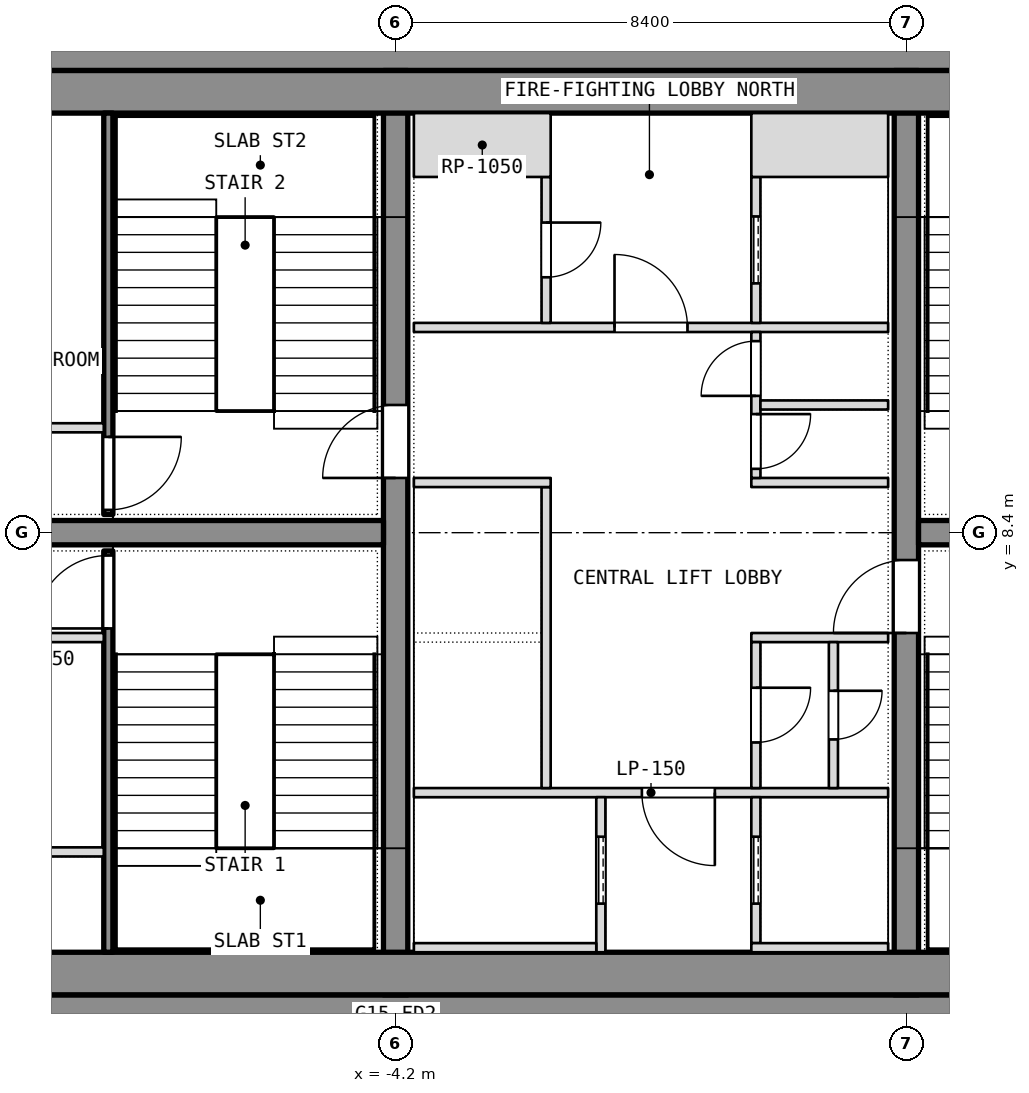
"""IFC4 building model, lengths in metres.
Left out: names, types, materials, properties, quantities, classifications, styles, units other than length and angle.
Written with IfcOpenShell. Run it as: python <this file> out.ifc"""

import sys

from ifc_helpers import new_model, si_unit, direction, frame, frame_2d, origin, place, context, subcontext, project, spatial, rectangle, extrude, element, fill, save


model = new_model("IFC4")
c1 = context("Model", 3, precision=1e-05, world=origin(), true_north=direction((0.0, 1.0)))
c2 = subcontext(c1, "Body", "Model", "MODEL_VIEW")
j1 = project(units=[si_unit("LENGTHUNIT", "METRE"), si_unit("PLANEANGLEUNIT", "RADIAN")], contexts=[c1])
p1 = place(None, origin())
s1 = spatial("IfcSite", under=j1, at=p1, CompositionType="ELEMENT")
p2 = place(p1, origin())
s2 = spatial("IfcBuilding", under=s1, at=p2, CompositionType="ELEMENT")
p3 = place(p2, frame((0.0, 0.0, 194.9)))
s3 = spatial("IfcBuildingStorey", under=s2, at=p3, CompositionType="ELEMENT", Elevation=194.9)
for number, where, z_axis, x_axis in (
    (1, (-11.1, 0.4, 0.0), (0.0, 0.0, 1.0), (1.0, 0.0, 0.0)),
    (2, (-11.1, 16.4, 0.0), (0.0, 0.0, 1.0), (1.0, 0.0, 0.0)),
):
    element("IfcWall", number, at=place(p3, frame(where, z_axis=z_axis, x_axis=x_axis)), inside=s3, PredefinedType="SHEAR", context=c2, shape_type="SweptSolid", body=[
        extrude(rectangle(XDim=22.2, YDim=0.8, at=frame_2d((11.1, 0.0))), origin(), (0.0, 0.0, 1.0), 3.6),
    ])
p4 = place(p3, frame((-4.2, 0.8, 0.0), z_axis=(0.0, 0.0, 1.0), x_axis=(0.0, 1.0, 0.0)))
e3 = element("IfcWall", 3, at=p4, inside=s3, PredefinedType="SHEAR", context=c2, shape_type="SweptSolid", body=[
    extrude(rectangle(XDim=15.2, YDim=0.4, at=frame_2d((7.6, 0.0))), origin(), (0.0, 0.0, 1.0), 3.6),
])
p5 = place(p4, frame((8.5, 0.0, 0.0)))
e4 = element("IfcOpeningElement", 4, at=p5, cuts=e3, PredefinedType="OPENING", context=c2, shape_type="SweptSolid", body=[
    extrude(rectangle(XDim=1.2, YDim=2.1, at=frame_2d((0.6, 1.05))), frame((0.0, 0.2, 0.0), z_axis=(0.0, -1.0, 0.0), x_axis=(1.0, 0.0, 0.0)), (0.0, 0.0, 1.0), 0.4),
])
p6 = place(p3, frame((4.2, 0.8, 0.0), z_axis=(0.0, 0.0, 1.0), x_axis=(0.0, 1.0, 0.0)))
e5 = element("IfcWall", 5, at=p6, inside=s3, PredefinedType="SHEAR", context=c2, shape_type="SweptSolid", body=[
    extrude(rectangle(XDim=15.2, YDim=0.4, at=frame_2d((7.6, 0.0))), origin(), (0.0, 0.0, 1.0), 3.6),
])
p7 = place(p6, frame((5.95, 0.0, 0.0)))
e6 = element("IfcOpeningElement", 6, at=p7, cuts=e5, PredefinedType="OPENING", context=c2, shape_type="SweptSolid", body=[
    extrude(rectangle(XDim=1.2, YDim=2.1, at=frame_2d((0.6, 1.05))), frame((0.0, 0.2, 0.0), z_axis=(0.0, -1.0, 0.0), x_axis=(1.0, 0.0, 0.0)), (0.0, 0.0, 1.0), 0.4),
])
for number, where, z_axis, x_axis in (
    (7, (-11.1, 8.4, 0.0), (0.0, 0.0, 1.0), (1.0, 0.0, 0.0)),
    (8, (4.4, 8.4, 0.0), (0.0, 0.0, 1.0), (1.0, 0.0, 0.0)),
):
    element("IfcWall", number, at=place(p3, frame(where, z_axis=z_axis, x_axis=x_axis)), inside=s3, PredefinedType="SHEAR", context=c2, shape_type="SweptSolid", body=[
        extrude(rectangle(XDim=6.7, YDim=0.4, at=frame_2d((3.35, 0.0))), origin(), (0.0, 0.0, 1.0), 3.6),
    ])
for number, where, z_axis, x_axis in (
    (9, (-11.1, 1.15, 0.0), (0.0, 0.0, 1.0), (1.0, 0.0, 0.0)),
    (10, (-11.1, 15.65, 0.0), (0.0, 0.0, 1.0), (1.0, 0.0, 0.0)),
):
    element("IfcWall", number, at=place(p3, frame(where, z_axis=z_axis, x_axis=x_axis)), inside=s3, PredefinedType="PARTITIONING", context=c2, shape_type="SweptSolid", body=[
        extrude(rectangle(XDim=22.2, YDim=0.7, at=frame_2d((11.1, 0.0))), origin(), (0.0, 0.0, 1.0), 3.34),
    ])
p8 = place(p3, frame((-8.925, 1.5, 0.0), z_axis=(0.0, 0.0, 1.0), x_axis=(0.0, 1.0, 0.0)))
e11 = element("IfcWall", 11, at=p8, inside=s3, PredefinedType="SHEAR", context=c2, shape_type="SweptSolid", body=[
    extrude(rectangle(XDim=6.6, YDim=0.15, at=frame_2d((3.3, 0.0))), origin(), (0.0, 0.0, 1.0), 3.34),
])
p9 = place(p8, frame((5.325, 0.0, 0.0)))
e12 = element("IfcOpeningElement", 12, at=p9, cuts=e11, PredefinedType="OPENING", context=c2, shape_type="SweptSolid", body=[
    extrude(rectangle(XDim=1.2, YDim=2.1, at=frame_2d((0.6, 1.05))), frame((0.0, 0.075, 0.0), z_axis=(0.0, -1.0, 0.0), x_axis=(1.0, 0.0, 0.0)), (0.0, 0.0, 1.0), 0.15),
])
for number, where, z_axis, x_axis in (
    (13, (-11.1, 6.675, 0.0), (0.0, 0.0, 1.0), (1.0, 0.0, 0.0)),
    (14, (-11.1, 3.15, 0.0), (0.0, 0.0, 1.0), (1.0, 0.0, 0.0)),
):
    element("IfcWall", number, at=place(p3, frame(where, z_axis=z_axis, x_axis=x_axis)), inside=s3, PredefinedType="PARTITIONING", context=c2, shape_type="SweptSolid", body=[
        extrude(rectangle(XDim=2.1, YDim=0.15, at=frame_2d((1.05, 0.0))), origin(), (0.0, 0.0, 1.0), 3.34),
    ])
p10 = place(p3, frame((-8.925, 8.7, 0.0), z_axis=(0.0, 0.0, 1.0), x_axis=(0.0, 1.0, 0.0)))
e15 = element("IfcWall", 15, at=p10, inside=s3, PredefinedType="SHEAR", context=c2, shape_type="SweptSolid", body=[
    extrude(rectangle(XDim=6.6, YDim=0.15, at=frame_2d((3.3, 0.0))), origin(), (0.0, 0.0, 1.0), 3.34),
])
p11 = place(p10, frame((0.075, 0.0, 0.0)))
e16 = element("IfcOpeningElement", 16, at=p11, cuts=e15, PredefinedType="OPENING", context=c2, shape_type="SweptSolid", body=[
    extrude(rectangle(XDim=1.2, YDim=2.1, at=frame_2d((0.6, 1.05))), frame((0.0, 0.075, 0.0), z_axis=(0.0, -1.0, 0.0), x_axis=(1.0, 0.0, 0.0)), (0.0, 0.0, 1.0), 0.15),
])
p12 = place(p3, frame((-11.1, 10.125, 0.0), z_axis=(0.0, 0.0, 1.0), x_axis=(1.0, 0.0, 0.0)))
e17 = element("IfcWall", 17, at=p12, inside=s3, PredefinedType="PARTITIONING", context=c2, shape_type="SweptSolid", body=[
    extrude(rectangle(XDim=2.1, YDim=0.15, at=frame_2d((1.05, 0.0))), origin(), (0.0, 0.0, 1.0), 3.34),
])
p13 = place(p3, frame((-3.9, 4.125, 0.0), z_axis=(0.0, 0.0, 1.0), x_axis=(1.0, 0.0, 0.0)))
e18 = element("IfcWall", 18, at=p13, inside=s3, PredefinedType="PARTITIONING", context=c2, shape_type="SweptSolid", body=[
    extrude(rectangle(XDim=7.8, YDim=0.15, at=frame_2d((3.9, 0.0))), origin(), (0.0, 0.0, 1.0), 3.34),
])
p14 = place(p13, frame((3.75, 0.0, 0.0)))
e19 = element("IfcOpeningElement", 19, at=p14, cuts=e18, PredefinedType="OPENING", context=c2, shape_type="SweptSolid", body=[
    extrude(rectangle(XDim=1.2, YDim=2.1, at=frame_2d((0.6, 1.05))), frame((0.0, 0.075, 0.0), z_axis=(0.0, -1.0, 0.0), x_axis=(1.0, 0.0, 0.0)), (0.0, 0.0, 1.0), 0.15),
])
p15 = place(p3, frame((-3.9, 11.775, 0.0), z_axis=(0.0, 0.0, 1.0), x_axis=(1.0, 0.0, 0.0)))
e20 = element("IfcWall", 20, at=p15, inside=s3, PredefinedType="PARTITIONING", context=c2, shape_type="SweptSolid", body=[
    extrude(rectangle(XDim=7.8, YDim=0.15, at=frame_2d((3.9, 0.0))), origin(), (0.0, 0.0, 1.0), 3.34),
])
p16 = place(p15, frame((3.3, 0.0, 0.0)))
e21 = element("IfcOpeningElement", 21, at=p16, cuts=e20, PredefinedType="OPENING", context=c2, shape_type="SweptSolid", body=[
    extrude(rectangle(XDim=1.2, YDim=2.1, at=frame_2d((0.6, 1.05))), frame((0.0, 0.075, 0.0), z_axis=(0.0, -1.0, 0.0), x_axis=(1.0, 0.0, 0.0)), (0.0, 0.0, 1.0), 0.15),
])
p17 = place(p3, frame((-0.825, 1.5, 0.0), z_axis=(0.0, 0.0, 1.0), x_axis=(0.0, 1.0, 0.0)))
e22 = element("IfcWall", 22, at=p17, inside=s3, PredefinedType="SHEAR", context=c2, shape_type="SweptSolid", body=[
    extrude(rectangle(XDim=2.55, YDim=0.15, at=frame_2d((1.275, 0.0))), origin(), (0.0, 0.0, 1.0), 3.6),
])
p18 = place(p17, frame((0.8, 0.0, 0.0)))
e23 = element("IfcOpeningElement", 23, at=p18, cuts=e22, PredefinedType="OPENING", context=c2, shape_type="SweptSolid", body=[
    extrude(rectangle(XDim=1.1, YDim=2.1, at=frame_2d((0.55, 1.05))), frame((0.0, 0.075, 0.0), z_axis=(0.0, -1.0, 0.0), x_axis=(1.0, 0.0, 0.0)), (0.0, 0.0, 1.0), 0.15),
])
p19 = place(p3, frame((-3.9, 1.575, 0.0), z_axis=(0.0, 0.0, 1.0), x_axis=(1.0, 0.0, 0.0)))
e24 = element("IfcWall", 24, at=p19, inside=s3, PredefinedType="SHEAR", context=c2, shape_type="SweptSolid", body=[
    extrude(rectangle(XDim=3.0, YDim=0.15, at=frame_2d((1.5, 0.0))), origin(), (0.0, 0.0, 1.0), 3.6),
])
p20 = place(p3, frame((-1.725, 4.2, 0.0), z_axis=(0.0, 0.0, 1.0), x_axis=(0.0, 1.0, 0.0)))
e25 = element("IfcWall", 25, at=p20, inside=s3, PredefinedType="SHEAR", context=c2, shape_type="SweptSolid", body=[
    extrude(rectangle(XDim=4.95, YDim=0.15, at=frame_2d((2.475, 0.0))), origin(), (0.0, 0.0, 1.0), 3.6),
])
p21 = place(p3, frame((-3.9, 9.225, 0.0), z_axis=(0.0, 0.0, 1.0), x_axis=(1.0, 0.0, 0.0)))
e26 = element("IfcWall", 26, at=p21, inside=s3, PredefinedType="SHEAR", context=c2, shape_type="SweptSolid", body=[
    extrude(rectangle(XDim=2.25, YDim=0.15, at=frame_2d((1.125, 0.0))), origin(), (0.0, 0.0, 1.0), 3.6),
])
p22 = place(p3, frame((-1.725, 11.85, 0.0), z_axis=(0.0, 0.0, 1.0), x_axis=(0.0, 1.0, 0.0)))
e27 = element("IfcWall", 27, at=p22, inside=s3, PredefinedType="PARTITIONING", context=c2, shape_type="SweptSolid", body=[
    extrude(rectangle(XDim=2.4, YDim=0.15, at=frame_2d((1.2, 0.0))), origin(), (0.0, 0.0, 1.0), 3.34),
])
p23 = place(p22, frame((0.75, 0.0, 0.0)))
e28 = element("IfcOpeningElement", 28, at=p23, cuts=e27, PredefinedType="OPENING", context=c2, shape_type="SweptSolid", body=[
    extrude(rectangle(XDim=0.9, YDim=2.1, at=frame_2d((0.45, 1.05))), frame((0.0, 0.075, 0.0), z_axis=(0.0, -1.0, 0.0), x_axis=(1.0, 0.0, 0.0)), (0.0, 0.0, 1.0), 0.15),
])
p24 = place(p3, frame((-3.9, 14.775, 0.0), z_axis=(0.0, 0.0, 1.0), x_axis=(1.0, 0.0, 0.0)))
e29 = element("IfcWall", 29, at=p24, inside=s3, PredefinedType="PARTITIONING", context=c2, shape_type="SweptSolid", body=[
    extrude(rectangle(XDim=2.25, YDim=1.05, at=frame_2d((1.125, 0.0))), origin(), (0.0, 0.0, 1.0), 3.34),
])
p25 = place(p3, frame((1.725, 1.65, 0.0), z_axis=(0.0, 0.0, 1.0), x_axis=(0.0, 1.0, 0.0)))
e30 = element("IfcWall", 30, at=p25, inside=s3, PredefinedType="SHEAR", context=c2, shape_type="SweptSolid", body=[
    extrude(rectangle(XDim=2.4, YDim=0.15, at=frame_2d((1.2, 0.0))), origin(), (0.0, 0.0, 1.0), 3.6),
])
p26 = place(p25, frame((0.65, 0.0, 0.0)))
e31 = element("IfcOpeningElement", 31, at=p26, cuts=e30, PredefinedType="OPENING", context=c2, shape_type="SweptSolid", body=[
    extrude(rectangle(XDim=1.1, YDim=2.1, at=frame_2d((0.55, 1.05))), frame((0.0, 0.075, 0.0), z_axis=(0.0, -1.0, 0.0), x_axis=(1.0, 0.0, 0.0)), (0.0, 0.0, 1.0), 0.15),
])
p27 = place(p3, frame((1.65, 1.575, 0.0), z_axis=(0.0, 0.0, 1.0), x_axis=(1.0, 0.0, 0.0)))
e32 = element("IfcWall", 32, at=p27, inside=s3, PredefinedType="SHEAR", context=c2, shape_type="SweptSolid", body=[
    extrude(rectangle(XDim=2.25, YDim=0.15, at=frame_2d((1.125, 0.0))), origin(), (0.0, 0.0, 1.0), 3.6),
])
p28 = place(p3, frame((1.725, 11.85, 0.0), z_axis=(0.0, 0.0, 1.0), x_axis=(0.0, 1.0, 0.0)))
e33 = element("IfcWall", 33, at=p28, inside=s3, PredefinedType="SHEAR", context=c2, shape_type="SweptSolid", body=[
    extrude(rectangle(XDim=2.4, YDim=0.15, at=frame_2d((1.2, 0.0))), origin(), (0.0, 0.0, 1.0), 3.6),
])
p29 = place(p28, frame((0.65, 0.0, 0.0)))
e34 = element("IfcOpeningElement", 34, at=p29, cuts=e33, PredefinedType="OPENING", context=c2, shape_type="SweptSolid", body=[
    extrude(rectangle(XDim=1.1, YDim=2.1, at=frame_2d((0.55, 1.05))), frame((0.0, 0.075, 0.0), z_axis=(0.0, -1.0, 0.0), x_axis=(1.0, 0.0, 0.0)), (0.0, 0.0, 1.0), 0.15),
])
p30 = place(p3, frame((1.65, 14.775, 0.0), z_axis=(0.0, 0.0, 1.0), x_axis=(1.0, 0.0, 0.0)))
e35 = element("IfcWall", 35, at=p30, inside=s3, PredefinedType="SHEAR", context=c2, shape_type="SweptSolid", body=[
    extrude(rectangle(XDim=2.25, YDim=1.05, at=frame_2d((1.125, 0.0))), origin(), (0.0, 0.0, 1.0), 3.6),
])
for number, where, z_axis, x_axis in (
    (36, (1.65, 6.675, 0.0), (0.0, 0.0, 1.0), (1.0, 0.0, 0.0)),
    (37, (1.65, 9.225, 0.0), (0.0, 0.0, 1.0), (1.0, 0.0, 0.0)),
):
    element("IfcWall", number, at=place(p3, frame(where, z_axis=z_axis, x_axis=x_axis)), inside=s3, PredefinedType="PARTITIONING", context=c2, shape_type="SweptSolid", body=[
        extrude(rectangle(XDim=2.25, YDim=0.15, at=frame_2d((1.125, 0.0))), origin(), (0.0, 0.0, 1.0), 3.34),
    ])
p31 = place(p3, frame((1.725, 4.2, 0.0), z_axis=(0.0, 0.0, 1.0), x_axis=(0.0, 1.0, 0.0)))
e38 = element("IfcWall", 38, at=p31, inside=s3, PredefinedType="PARTITIONING", context=c2, shape_type="SweptSolid", body=[
    extrude(rectangle(XDim=2.4, YDim=0.15, at=frame_2d((1.2, 0.0))), origin(), (0.0, 0.0, 1.0), 3.34),
])
p32 = place(p31, frame((0.75, 0.0, 0.0)))
e39 = element("IfcOpeningElement", 39, at=p32, cuts=e38, PredefinedType="OPENING", context=c2, shape_type="SweptSolid", body=[
    extrude(rectangle(XDim=0.9, YDim=2.1, at=frame_2d((0.45, 1.05))), frame((0.0, 0.075, 0.0), z_axis=(0.0, -1.0, 0.0), x_axis=(1.0, 0.0, 0.0)), (0.0, 0.0, 1.0), 0.15),
])
p33 = place(p3, frame((1.725, 9.3, 0.0), z_axis=(0.0, 0.0, 1.0), x_axis=(0.0, 1.0, 0.0)))
e40 = element("IfcWall", 40, at=p33, inside=s3, PredefinedType="PARTITIONING", context=c2, shape_type="SweptSolid", body=[
    extrude(rectangle(XDim=2.4, YDim=0.15, at=frame_2d((1.2, 0.0))), origin(), (0.0, 0.0, 1.0), 3.34),
])
p34 = place(p33, frame((0.15, 0.0, 0.0)))
e41 = element("IfcOpeningElement", 41, at=p34, cuts=e40, PredefinedType="OPENING", context=c2, shape_type="SweptSolid", body=[
    extrude(rectangle(XDim=0.9, YDim=2.1, at=frame_2d((0.45, 1.05))), frame((0.0, 0.075, 0.0), z_axis=(0.0, -1.0, 0.0), x_axis=(1.0, 0.0, 0.0)), (0.0, 0.0, 1.0), 0.15),
])
p35 = place(p33, frame((1.35, 0.0, 0.0)))
e42 = element("IfcOpeningElement", 42, at=p35, cuts=e40, PredefinedType="OPENING", context=c2, shape_type="SweptSolid", body=[
    extrude(rectangle(XDim=0.9, YDim=2.1, at=frame_2d((0.45, 1.05))), frame((0.0, 0.075, 0.0), z_axis=(0.0, -1.0, 0.0), x_axis=(1.0, 0.0, 0.0)), (0.0, 0.0, 1.0), 0.15),
])
p36 = place(p3, frame((3.0, 4.2, 0.0), z_axis=(0.0, 0.0, 1.0), x_axis=(0.0, 1.0, 0.0)))
e43 = element("IfcWall", 43, at=p36, inside=s3, PredefinedType="PARTITIONING", context=c2, shape_type="SweptSolid", body=[
    extrude(rectangle(XDim=2.4, YDim=0.15, at=frame_2d((1.2, 0.0))), origin(), (0.0, 0.0, 1.0), 3.34),
])
p37 = place(p36, frame((0.8, 0.0, 0.0)))
e44 = element("IfcOpeningElement", 44, at=p37, cuts=e43, PredefinedType="OPENING", context=c2, shape_type="SweptSolid", body=[
    extrude(rectangle(XDim=0.8, YDim=2.1, at=frame_2d((0.4, 1.05))), frame((0.0, 0.075, 0.0), z_axis=(0.0, -1.0, 0.0), x_axis=(1.0, 0.0, 0.0)), (0.0, 0.0, 1.0), 0.15),
])
p38 = place(p3, frame((1.8, 10.5, 0.0), z_axis=(0.0, 0.0, 1.0), x_axis=(1.0, 0.0, 0.0)))
e45 = element("IfcWall", 45, at=p38, inside=s3, PredefinedType="PARTITIONING", context=c2, shape_type="SweptSolid", body=[
    extrude(rectangle(XDim=2.1, YDim=0.15, at=frame_2d((1.05, 0.0))), origin(), (0.0, 0.0, 1.0), 3.34),
])
p39 = place(p9, origin())
e46 = element("IfcDoor", 46, at=p39, inside=s3, OperationType="SINGLE_SWING_LEFT", PredefinedType="DOOR", context=c2, shape_type="SweptSolid", body=[
    extrude(rectangle(XDim=1.2, YDim=2.1, at=frame_2d((0.6, 1.05))), frame((0.0, 0.025, 0.0), z_axis=(0.0, -1.0, 0.0), x_axis=(1.0, 0.0, 0.0)), (0.0, 0.0, 1.0), 0.05),
])
fill(e12, e46)
p40 = place(p11, origin())
e47 = element("IfcDoor", 47, at=p40, inside=s3, OperationType="SINGLE_SWING_LEFT", PredefinedType="DOOR", context=c2, shape_type="SweptSolid", body=[
    extrude(rectangle(XDim=1.2, YDim=2.1, at=frame_2d((0.6, 1.05))), frame((0.0, 0.025, 0.0), z_axis=(0.0, -1.0, 0.0), x_axis=(1.0, 0.0, 0.0)), (0.0, 0.0, 1.0), 0.05),
])
fill(e16, e47)
p41 = place(p32, origin())
e48 = element("IfcDoor", 48, at=p41, inside=s3, OperationType="SINGLE_SWING_LEFT", PredefinedType="DOOR", context=c2, shape_type="SweptSolid", body=[
    extrude(rectangle(XDim=0.9, YDim=2.1, at=frame_2d((0.45, 1.05))), frame((0.0, 0.025, 0.0), z_axis=(0.0, -1.0, 0.0), x_axis=(1.0, 0.0, 0.0)), (0.0, 0.0, 1.0), 0.05),
])
fill(e39, e48)
p42 = place(p37, origin())
e49 = element("IfcDoor", 49, at=p42, inside=s3, OperationType="SINGLE_SWING_LEFT", PredefinedType="DOOR", context=c2, shape_type="SweptSolid", body=[
    extrude(rectangle(XDim=0.8, YDim=2.1, at=frame_2d((0.4, 1.05))), frame((0.0, 0.025, 0.0), z_axis=(0.0, -1.0, 0.0), x_axis=(1.0, 0.0, 0.0)), (0.0, 0.0, 1.0), 0.05),
])
fill(e44, e49)
p43 = place(p34, origin())
e50 = element("IfcDoor", 50, at=p43, inside=s3, OperationType="SINGLE_SWING_LEFT", PredefinedType="DOOR", context=c2, shape_type="SweptSolid", body=[
    extrude(rectangle(XDim=0.9, YDim=2.1, at=frame_2d((0.45, 1.05))), frame((0.0, 0.025, 0.0), z_axis=(0.0, -1.0, 0.0), x_axis=(1.0, 0.0, 0.0)), (0.0, 0.0, 1.0), 0.05),
])
fill(e41, e50)
p44 = place(p35, origin())
e51 = element("IfcDoor", 51, at=p44, inside=s3, OperationType="SINGLE_SWING_LEFT", PredefinedType="DOOR", context=c2, shape_type="SweptSolid", body=[
    extrude(rectangle(XDim=0.9, YDim=2.1, at=frame_2d((0.45, 1.05))), frame((0.0, 0.025, 0.0), z_axis=(0.0, -1.0, 0.0), x_axis=(1.0, 0.0, 0.0)), (0.0, 0.0, 1.0), 0.05),
])
fill(e42, e51)
p45 = place(p18, origin())
e52 = element("IfcDoor", 52, at=p45, inside=s3, OperationType="SLIDING_TO_LEFT", PredefinedType="DOOR", context=c2, shape_type="SweptSolid", body=[
    extrude(rectangle(XDim=1.1, YDim=2.1, at=frame_2d((0.55, 1.05))), frame((0.0, 0.025, 0.0), z_axis=(0.0, -1.0, 0.0), x_axis=(1.0, 0.0, 0.0)), (0.0, 0.0, 1.0), 0.05),
])
fill(e23, e52)
p46 = place(p26, origin())
e53 = element("IfcDoor", 53, at=p46, inside=s3, OperationType="SLIDING_TO_LEFT", PredefinedType="DOOR", context=c2, shape_type="SweptSolid", body=[
    extrude(rectangle(XDim=1.1, YDim=2.1, at=frame_2d((0.55, 1.05))), frame((0.0, 0.025, 0.0), z_axis=(0.0, -1.0, 0.0), x_axis=(1.0, 0.0, 0.0)), (0.0, 0.0, 1.0), 0.05),
])
fill(e31, e53)
p47 = place(p29, origin())
e54 = element("IfcDoor", 54, at=p47, inside=s3, OperationType="SLIDING_TO_LEFT", PredefinedType="DOOR", context=c2, shape_type="SweptSolid", body=[
    extrude(rectangle(XDim=1.1, YDim=2.1, at=frame_2d((0.55, 1.05))), frame((0.0, 0.025, 0.0), z_axis=(0.0, -1.0, 0.0), x_axis=(1.0, 0.0, 0.0)), (0.0, 0.0, 1.0), 0.05),
])
fill(e34, e54)
p48 = place(p14, origin())
e55 = element("IfcDoor", 55, at=p48, inside=s3, OperationType="SINGLE_SWING_LEFT", PredefinedType="DOOR", context=c2, shape_type="SweptSolid", body=[
    extrude(rectangle(XDim=1.2, YDim=2.1, at=frame_2d((0.6, 1.05))), frame((0.0, 0.025, 0.0), z_axis=(0.0, -1.0, 0.0), x_axis=(1.0, 0.0, 0.0)), (0.0, 0.0, 1.0), 0.05),
])
fill(e19, e55)
p49 = place(p16, origin())
e56 = element("IfcDoor", 56, at=p49, inside=s3, OperationType="SINGLE_SWING_LEFT", PredefinedType="DOOR", context=c2, shape_type="SweptSolid", body=[
    extrude(rectangle(XDim=1.2, YDim=2.1, at=frame_2d((0.6, 1.05))), frame((0.0, 0.025, 0.0), z_axis=(0.0, -1.0, 0.0), x_axis=(1.0, 0.0, 0.0)), (0.0, 0.0, 1.0), 0.05),
])
fill(e21, e56)
p50 = place(p23, origin())
e57 = element("IfcDoor", 57, at=p50, inside=s3, OperationType="SINGLE_SWING_LEFT", PredefinedType="DOOR", context=c2, shape_type="SweptSolid", body=[
    extrude(rectangle(XDim=0.9, YDim=2.1, at=frame_2d((0.45, 1.05))), frame((0.0, 0.025, 0.0), z_axis=(0.0, -1.0, 0.0), x_axis=(1.0, 0.0, 0.0)), (0.0, 0.0, 1.0), 0.05),
])
fill(e28, e57)
p51 = place(p5, origin())
e58 = element("IfcDoor", 58, at=p51, inside=s3, OperationType="SINGLE_SWING_LEFT", PredefinedType="DOOR", context=c2, shape_type="SweptSolid", body=[
    extrude(rectangle(XDim=1.2, YDim=2.1, at=frame_2d((0.6, 1.05))), frame((0.0, 0.025, 0.0), z_axis=(0.0, -1.0, 0.0), x_axis=(1.0, 0.0, 0.0)), (0.0, 0.0, 1.0), 0.05),
])
fill(e4, e58)
p52 = place(p7, origin())
e59 = element("IfcDoor", 59, at=p52, inside=s3, OperationType="SINGLE_SWING_LEFT", PredefinedType="DOOR", context=c2, shape_type="SweptSolid", body=[
    extrude(rectangle(XDim=1.2, YDim=2.1, at=frame_2d((0.6, 1.05))), frame((0.0, 0.025, 0.0), z_axis=(0.0, -1.0, 0.0), x_axis=(1.0, 0.0, 0.0)), (0.0, 0.0, 1.0), 0.05),
])
fill(e6, e59)
save(model, sys.argv[1])
